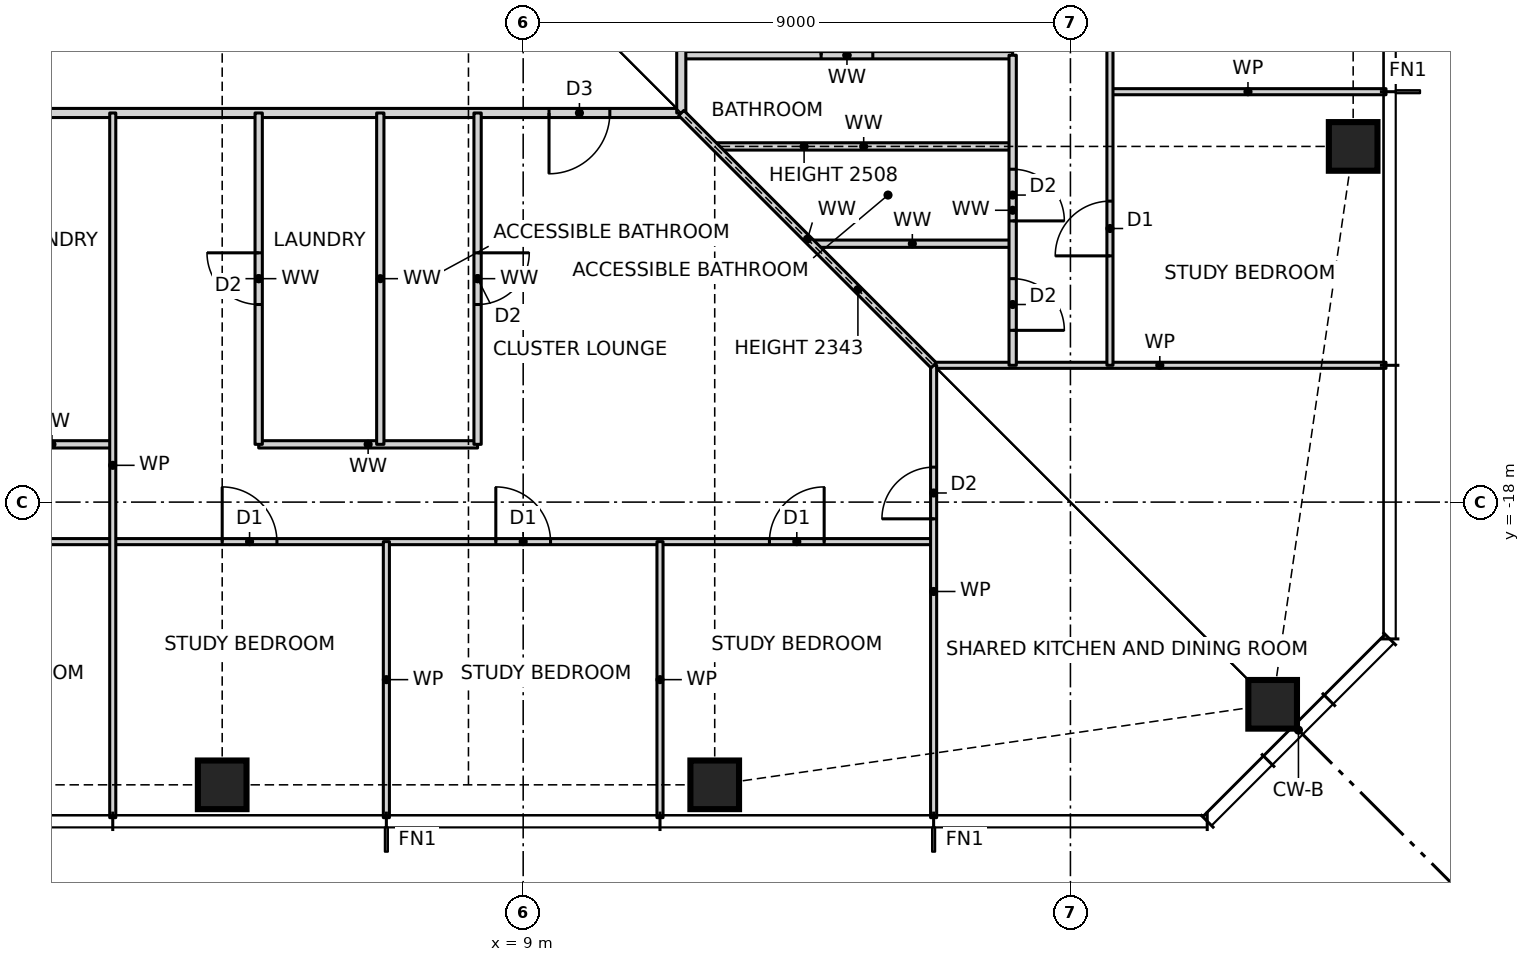
"""IFC4 building model, lengths in metres.
Left out: names, types, materials, properties, quantities, classifications, styles, units other than length and angle.
Written with IfcOpenShell. Run it as: python <this file> out.ifc"""

import sys

from ifc_helpers import new_model, si_unit, direction, frame, frame_2d, origin, origin_2d, place, context, subcontext, project, spatial, rectangle, hollow_rectangle, extrude, element, fill, save


model = new_model("IFC4")
c1 = context("Model", 3, precision=1e-05, world=origin(), true_north=direction((0.0, 1.0)))
c2 = subcontext(c1, "Body", "Model", "MODEL_VIEW")
j1 = project(units=[si_unit("LENGTHUNIT", "METRE"), si_unit("PLANEANGLEUNIT", "RADIAN")], contexts=[c1])
p1 = place(None, origin())
s1 = spatial("IfcSite", under=j1, at=p1, CompositionType="ELEMENT")
p2 = place(p1, origin())
s2 = spatial("IfcBuilding", under=s1, at=p2, CompositionType="ELEMENT")
p3 = place(p2, frame((0.0, 0.0, 50.0)))
s3 = spatial("IfcBuildingStorey", under=s2, at=p3, CompositionType="ELEMENT", Elevation=50.0)
for number, where, z_axis, x_axis in (
    (1, (4.05, -22.65, 0.0), (0.0, 0.0, 1.0), (1.0, 0.0, 0.0)),
    (2, (12.15, -22.65, 0.0), (0.0, 0.0, 1.0), (1.0, 0.0, 0.0)),
    (3, (21.326, -21.326, 0.0), (0.0, 0.0, 1.0), (1.0, 0.0, 0.0)),
    (4, (22.65, -12.15, 0.0), (0.0, 0.0, 1.0), (1.0, 0.0, 0.0)),
):
    element("IfcColumn", number, at=place(p3, frame(where, z_axis=z_axis, x_axis=x_axis)), inside=s3, PredefinedType="COLUMN", context=c2, shape_type="SweptSolid", body=[
        extrude(hollow_rectangle(XDim=0.8, YDim=0.8, WallThickness=0.09, at=origin_2d()), origin(), (0.0, 0.0, 1.0), 3.5),
    ])
p4 = place(p3, frame((-15.75, -18.65, 0.0), z_axis=(0.0, 0.0, 1.0), x_axis=(1.0, 0.0, 0.0)))
e5 = element("IfcWall", 5, at=p4, inside=s3, PredefinedType="PARTITIONING", context=c2, shape_type="SweptSolid", body=[
    extrude(rectangle(XDim=31.5, YDim=0.1, at=frame_2d((15.75, 0.0))), origin(), (0.0, 0.0, 1.0), 3.27),
])
p5 = place(p4, frame((1.8, 0.0, 0.0)))
e6 = element("IfcOpeningElement", 6, at=p5, cuts=e5, PredefinedType="OPENING", context=c2, shape_type="SweptSolid", body=[
    extrude(rectangle(XDim=0.9, YDim=2.1, at=frame_2d((0.45, 1.05))), frame((0.0, 0.06, 0.0), z_axis=(0.0, -1.0, 0.0), x_axis=(1.0, 0.0, 0.0)), (0.0, 0.0, 1.0), 0.12),
])
p6 = place(p4, frame((6.3, 0.0, 0.0)))
e7 = element("IfcOpeningElement", 7, at=p6, cuts=e5, PredefinedType="OPENING", context=c2, shape_type="SweptSolid", body=[
    extrude(rectangle(XDim=0.9, YDim=2.1, at=frame_2d((0.45, 1.05))), frame((0.0, 0.06, 0.0), z_axis=(0.0, -1.0, 0.0), x_axis=(1.0, 0.0, 0.0)), (0.0, 0.0, 1.0), 0.12),
])
p7 = place(p4, frame((10.8, 0.0, 0.0)))
e8 = element("IfcOpeningElement", 8, at=p7, cuts=e5, PredefinedType="OPENING", context=c2, shape_type="SweptSolid", body=[
    extrude(rectangle(XDim=0.9, YDim=2.1, at=frame_2d((0.45, 1.05))), frame((0.0, 0.06, 0.0), z_axis=(0.0, -1.0, 0.0), x_axis=(1.0, 0.0, 0.0)), (0.0, 0.0, 1.0), 0.12),
])
p8 = place(p4, frame((15.3, 0.0, 0.0)))
e9 = element("IfcOpeningElement", 9, at=p8, cuts=e5, PredefinedType="OPENING", context=c2, shape_type="SweptSolid", body=[
    extrude(rectangle(XDim=0.9, YDim=2.1, at=frame_2d((0.45, 1.05))), frame((0.0, 0.06, 0.0), z_axis=(0.0, -1.0, 0.0), x_axis=(1.0, 0.0, 0.0)), (0.0, 0.0, 1.0), 0.12),
])
p9 = place(p4, frame((19.8, 0.0, 0.0)))
e10 = element("IfcOpeningElement", 10, at=p9, cuts=e5, PredefinedType="OPENING", context=c2, shape_type="SweptSolid", body=[
    extrude(rectangle(XDim=0.9, YDim=2.1, at=frame_2d((0.45, 1.05))), frame((0.0, 0.06, 0.0), z_axis=(0.0, -1.0, 0.0), x_axis=(1.0, 0.0, 0.0)), (0.0, 0.0, 1.0), 0.12),
])
p10 = place(p4, frame((24.3, 0.0, 0.0)))
e11 = element("IfcOpeningElement", 11, at=p10, cuts=e5, PredefinedType="OPENING", context=c2, shape_type="SweptSolid", body=[
    extrude(rectangle(XDim=0.9, YDim=2.1, at=frame_2d((0.45, 1.05))), frame((0.0, 0.06, 0.0), z_axis=(0.0, -1.0, 0.0), x_axis=(1.0, 0.0, 0.0)), (0.0, 0.0, 1.0), 0.12),
])
p11 = place(p4, frame((28.8, 0.0, 0.0)))
e12 = element("IfcOpeningElement", 12, at=p11, cuts=e5, PredefinedType="OPENING", context=c2, shape_type="SweptSolid", body=[
    extrude(rectangle(XDim=0.9, YDim=2.1, at=frame_2d((0.45, 1.05))), frame((0.0, 0.06, 0.0), z_axis=(0.0, -1.0, 0.0), x_axis=(1.0, 0.0, 0.0)), (0.0, 0.0, 1.0), 0.12),
])
p12 = place(p3, frame((0.25, -17.05, 0.0), z_axis=(0.0, 0.0, 1.0), x_axis=(1.0, 0.0, 0.0)))
e13 = element("IfcWall", 13, at=p12, inside=s3, PredefinedType="PARTITIONING", context=c2, shape_type="SweptSolid", body=[
    extrude(rectangle(XDim=2.0, YDim=0.12, at=frame_2d((1.0, 0.0))), origin(), (0.0, 0.0, 1.0), 3.27),
])
p13 = place(p3, frame((4.65, -17.05, 0.0), z_axis=(0.0, 0.0, 1.0), x_axis=(1.0, 0.0, 0.0)))
e14 = element("IfcWall", 14, at=p13, inside=s3, PredefinedType="PARTITIONING", context=c2, shape_type="SweptSolid", body=[
    extrude(rectangle(XDim=3.6, YDim=0.12, at=frame_2d((1.8, 0.0))), origin(), (0.0, 0.0, 1.0), 3.27),
])
p14 = place(p3, frame((15.75, -15.75, 0.0), z_axis=(0.0, 0.0, 1.0), x_axis=(1.0, 0.0, 0.0)))
e15 = element("IfcWall", 15, at=p14, inside=s3, PredefinedType="PARTITIONING", context=c2, shape_type="SweptSolid", body=[
    extrude(rectangle(XDim=7.44, YDim=0.1, at=frame_2d((3.72, 0.0))), origin(), (0.0, 0.0, 1.0), 3.27),
])
p15 = place(p3, frame((13.75, -13.75, 0.0), z_axis=(0.0, 0.0, 1.0), x_axis=(1.0, 0.0, 0.0)))
e16 = element("IfcWall", 16, at=p15, inside=s3, PredefinedType="PARTITIONING", context=c2, shape_type="SweptSolid", body=[
    extrude(rectangle(XDim=3.3, YDim=0.12, at=frame_2d((1.65, 0.0))), origin(), (0.0, 0.0, 1.0), 3.27),
])
p16 = place(p3, frame((12.15, -12.15, 0.0), z_axis=(0.0, 0.0, 1.0), x_axis=(1.0, 0.0, 0.0)))
e17 = element("IfcWall", 17, at=p16, inside=s3, PredefinedType="PARTITIONING", context=c2, shape_type="SweptSolid", body=[
    extrude(rectangle(XDim=4.9, YDim=0.12, at=frame_2d((2.45, 0.0))), origin(), (0.0, 0.0, 1.0), 2.508),
])
p17 = place(p3, frame((-12.6, -11.6, 0.0), z_axis=(0.0, 0.0, 1.0), x_axis=(1.0, 0.0, 0.0)))
e18 = element("IfcWall", 18, at=p17, inside=s3, PredefinedType="PARTITIONING", context=c2, shape_type="SweptSolid", body=[
    extrude(rectangle(XDim=24.2, YDim=0.15, at=frame_2d((12.1, 0.0))), origin(), (0.0, 0.0, 1.0), 3.27),
])
p18 = place(p17, frame((1.74, 0.0, 0.0)))
e19 = element("IfcOpeningElement", 19, at=p18, cuts=e18, PredefinedType="OPENING", context=c2, shape_type="SweptSolid", body=[
    extrude(rectangle(XDim=1.0, YDim=2.1, at=frame_2d((0.5, 1.05))), frame((0.0, 0.085, 0.0), z_axis=(0.0, -1.0, 0.0), x_axis=(1.0, 0.0, 0.0)), (0.0, 0.0, 1.0), 0.17),
])
p19 = place(p17, frame((22.025, 0.0, 0.0)))
e20 = element("IfcOpeningElement", 20, at=p19, cuts=e18, PredefinedType="OPENING", context=c2, shape_type="SweptSolid", body=[
    extrude(rectangle(XDim=1.0, YDim=2.1, at=frame_2d((0.5, 1.05))), frame((0.0, 0.085, 0.0), z_axis=(0.0, -1.0, 0.0), x_axis=(1.0, 0.0, 0.0)), (0.0, 0.0, 1.0), 0.17),
])
p20 = place(p3, frame((18.65, -11.25, 0.0), z_axis=(0.0, 0.0, 1.0), x_axis=(1.0, 0.0, 0.0)))
e21 = element("IfcWall", 21, at=p20, inside=s3, PredefinedType="PARTITIONING", context=c2, shape_type="SweptSolid", body=[
    extrude(rectangle(XDim=4.54, YDim=0.1, at=frame_2d((2.27, 0.0))), origin(), (0.0, 0.0, 1.0), 3.27),
])
p21 = place(p3, frame((11.6, -10.65, 0.0), z_axis=(0.0, 0.0, 1.0), x_axis=(1.0, 0.0, 0.0)))
e22 = element("IfcWall", 22, at=p21, inside=s3, PredefinedType="PARTITIONING", context=c2, shape_type="SweptSolid", body=[
    extrude(rectangle(XDim=5.45, YDim=0.12, at=frame_2d((2.725, 0.0))), origin(), (0.0, 0.0, 1.0), 3.27),
])
p22 = place(p21, frame((2.3, 0.0, 0.0)))
e23 = element("IfcOpeningElement", 23, at=p22, cuts=e22, PredefinedType="OPENING", context=c2, shape_type="SweptSolid", body=[
    extrude(rectangle(XDim=0.85, YDim=2.1, at=frame_2d((0.425, 1.05))), frame((0.0, 0.07, 0.0), z_axis=(0.0, -1.0, 0.0), x_axis=(1.0, 0.0, 0.0)), (0.0, 0.0, 1.0), 0.14),
])
p23 = place(p3, frame((18.65, -15.75, 0.0), z_axis=(0.0, 0.0, 1.0), x_axis=(0.0, 1.0, 0.0)))
e24 = element("IfcWall", 24, at=p23, inside=s3, PredefinedType="PARTITIONING", context=c2, shape_type="SweptSolid", body=[
    extrude(rectangle(XDim=31.5, YDim=0.1, at=frame_2d((15.75, 0.0))), origin(), (0.0, 0.0, 1.0), 3.27),
])
p24 = place(p23, frame((1.8, 0.0, 0.0)))
e25 = element("IfcOpeningElement", 25, at=p24, cuts=e24, PredefinedType="OPENING", context=c2, shape_type="SweptSolid", body=[
    extrude(rectangle(XDim=0.9, YDim=2.1, at=frame_2d((0.45, 1.05))), frame((0.0, 0.06, 0.0), z_axis=(0.0, -1.0, 0.0), x_axis=(1.0, 0.0, 0.0)), (0.0, 0.0, 1.0), 0.12),
])
p25 = place(p23, frame((6.3, 0.0, 0.0)))
e26 = element("IfcOpeningElement", 26, at=p25, cuts=e24, PredefinedType="OPENING", context=c2, shape_type="SweptSolid", body=[
    extrude(rectangle(XDim=0.9, YDim=2.1, at=frame_2d((0.45, 1.05))), frame((0.0, 0.06, 0.0), z_axis=(0.0, -1.0, 0.0), x_axis=(1.0, 0.0, 0.0)), (0.0, 0.0, 1.0), 0.12),
])
p26 = place(p23, frame((10.8, 0.0, 0.0)))
e27 = element("IfcOpeningElement", 27, at=p26, cuts=e24, PredefinedType="OPENING", context=c2, shape_type="SweptSolid", body=[
    extrude(rectangle(XDim=0.9, YDim=2.1, at=frame_2d((0.45, 1.05))), frame((0.0, 0.06, 0.0), z_axis=(0.0, -1.0, 0.0), x_axis=(1.0, 0.0, 0.0)), (0.0, 0.0, 1.0), 0.12),
])
p27 = place(p23, frame((15.3, 0.0, 0.0)))
e28 = element("IfcOpeningElement", 28, at=p27, cuts=e24, PredefinedType="OPENING", context=c2, shape_type="SweptSolid", body=[
    extrude(rectangle(XDim=0.9, YDim=2.1, at=frame_2d((0.45, 1.05))), frame((0.0, 0.06, 0.0), z_axis=(0.0, -1.0, 0.0), x_axis=(1.0, 0.0, 0.0)), (0.0, 0.0, 1.0), 0.12),
])
p28 = place(p23, frame((19.8, 0.0, 0.0)))
e29 = element("IfcOpeningElement", 29, at=p28, cuts=e24, PredefinedType="OPENING", context=c2, shape_type="SweptSolid", body=[
    extrude(rectangle(XDim=0.9, YDim=2.1, at=frame_2d((0.45, 1.05))), frame((0.0, 0.06, 0.0), z_axis=(0.0, -1.0, 0.0), x_axis=(1.0, 0.0, 0.0)), (0.0, 0.0, 1.0), 0.12),
])
p29 = place(p23, frame((24.3, 0.0, 0.0)))
e30 = element("IfcOpeningElement", 30, at=p29, cuts=e24, PredefinedType="OPENING", context=c2, shape_type="SweptSolid", body=[
    extrude(rectangle(XDim=0.9, YDim=2.1, at=frame_2d((0.45, 1.05))), frame((0.0, 0.06, 0.0), z_axis=(0.0, -1.0, 0.0), x_axis=(1.0, 0.0, 0.0)), (0.0, 0.0, 1.0), 0.12),
])
p30 = place(p23, frame((28.8, 0.0, 0.0)))
e31 = element("IfcOpeningElement", 31, at=p30, cuts=e24, PredefinedType="OPENING", context=c2, shape_type="SweptSolid", body=[
    extrude(rectangle(XDim=0.9, YDim=2.1, at=frame_2d((0.45, 1.05))), frame((0.0, 0.06, 0.0), z_axis=(0.0, -1.0, 0.0), x_axis=(1.0, 0.0, 0.0)), (0.0, 0.0, 1.0), 0.12),
])
p31 = place(p3, frame((17.05, -15.75, 0.0), z_axis=(0.0, 0.0, 1.0), x_axis=(0.0, 1.0, 0.0)))
e32 = element("IfcWall", 32, at=p31, inside=s3, PredefinedType="PARTITIONING", context=c2, shape_type="SweptSolid", body=[
    extrude(rectangle(XDim=5.1, YDim=0.12, at=frame_2d((2.55, 0.0))), origin(), (0.0, 0.0, 1.0), 3.27),
])
p32 = place(p31, frame((0.575, 0.0, 0.0)))
e33 = element("IfcOpeningElement", 33, at=p32, cuts=e32, PredefinedType="OPENING", context=c2, shape_type="SweptSolid", body=[
    extrude(rectangle(XDim=0.85, YDim=2.1, at=frame_2d((0.425, 1.05))), frame((0.0, 0.07, 0.0), z_axis=(0.0, -1.0, 0.0), x_axis=(1.0, 0.0, 0.0)), (0.0, 0.0, 1.0), 0.14),
])
p33 = place(p31, frame((2.375, 0.0, 0.0)))
e34 = element("IfcOpeningElement", 34, at=p33, cuts=e32, PredefinedType="OPENING", context=c2, shape_type="SweptSolid", body=[
    extrude(rectangle(XDim=0.85, YDim=2.1, at=frame_2d((0.425, 1.05))), frame((0.0, 0.07, 0.0), z_axis=(0.0, -1.0, 0.0), x_axis=(1.0, 0.0, 0.0)), (0.0, 0.0, 1.0), 0.14),
])
p34 = place(p3, frame((15.75, -23.19, 0.0), z_axis=(0.0, 0.0, 1.0), x_axis=(0.0, 1.0, 0.0)))
e35 = element("IfcWall", 35, at=p34, inside=s3, PredefinedType="PARTITIONING", context=c2, shape_type="SweptSolid", body=[
    extrude(rectangle(XDim=7.44, YDim=0.1, at=frame_2d((3.72, 0.0))), origin(), (0.0, 0.0, 1.0), 3.27),
])
p35 = place(p34, frame((4.915, 0.0, 0.0)))
e36 = element("IfcOpeningElement", 36, at=p35, cuts=e35, PredefinedType="OPENING", context=c2, shape_type="SweptSolid", body=[
    extrude(rectangle(XDim=0.85, YDim=2.1, at=frame_2d((0.425, 1.05))), frame((0.0, 0.06, 0.0), z_axis=(0.0, -1.0, 0.0), x_axis=(1.0, 0.0, 0.0)), (0.0, 0.0, 1.0), 0.12),
])
p36 = place(p3, frame((11.6, -11.6, 0.0), z_axis=(0.0, 0.0, 1.0), x_axis=(0.0, 1.0, 0.0)))
e37 = element("IfcWall", 37, at=p36, inside=s3, PredefinedType="PARTITIONING", context=c2, shape_type="SweptSolid", body=[
    extrude(rectangle(XDim=23.2, YDim=0.15, at=frame_2d((11.6, 0.0))), origin(), (0.0, 0.0, 1.0), 3.27),
])
p37 = place(p36, frame((1.65, 0.0, 0.0)))
e38 = element("IfcOpeningElement", 38, at=p37, cuts=e37, PredefinedType="OPENING", context=c2, shape_type="SweptSolid", body=[
    extrude(rectangle(XDim=1.0, YDim=2.1, at=frame_2d((0.5, 1.05))), frame((0.0, 0.085, 0.0), z_axis=(0.0, -1.0, 0.0), x_axis=(1.0, 0.0, 0.0)), (0.0, 0.0, 1.0), 0.17),
])
p38 = place(p36, frame((3.8, 0.0, 0.0)))
e39 = element("IfcOpeningElement", 39, at=p38, cuts=e37, PredefinedType="OPENING", context=c2, shape_type="SweptSolid", body=[
    extrude(rectangle(XDim=0.9, YDim=2.1, at=frame_2d((0.45, 1.05))), frame((0.0, 0.085, 0.0), z_axis=(0.0, -1.0, 0.0), x_axis=(1.0, 0.0, 0.0)), (0.0, 0.0, 1.0), 0.17),
])
p39 = place(p3, frame((11.25, -23.19, 0.0), z_axis=(0.0, 0.0, 1.0), x_axis=(0.0, 1.0, 0.0)))
e40 = element("IfcWall", 40, at=p39, inside=s3, PredefinedType="PARTITIONING", context=c2, shape_type="SweptSolid", body=[
    extrude(rectangle(XDim=4.54, YDim=0.1, at=frame_2d((2.27, 0.0))), origin(), (0.0, 0.0, 1.0), 3.27),
])
p40 = place(p3, frame((8.25, -17.05, 0.0), z_axis=(0.0, 0.0, 1.0), x_axis=(0.0, 1.0, 0.0)))
e41 = element("IfcWall", 41, at=p40, inside=s3, PredefinedType="PARTITIONING", context=c2, shape_type="SweptSolid", body=[
    extrude(rectangle(XDim=5.45, YDim=0.12, at=frame_2d((2.725, 0.0))), origin(), (0.0, 0.0, 1.0), 3.27),
])
p41 = place(p40, frame((2.3, 0.0, 0.0)))
e42 = element("IfcOpeningElement", 42, at=p41, cuts=e41, PredefinedType="OPENING", context=c2, shape_type="SweptSolid", body=[
    extrude(rectangle(XDim=0.85, YDim=2.1, at=frame_2d((0.425, 1.05))), frame((0.0, 0.07, 0.0), z_axis=(0.0, -1.0, 0.0), x_axis=(1.0, 0.0, 0.0)), (0.0, 0.0, 1.0), 0.14),
])
p42 = place(p3, frame((6.75, -23.19, 0.0), z_axis=(0.0, 0.0, 1.0), x_axis=(0.0, 1.0, 0.0)))
e43 = element("IfcWall", 43, at=p42, inside=s3, PredefinedType="PARTITIONING", context=c2, shape_type="SweptSolid", body=[
    extrude(rectangle(XDim=4.54, YDim=0.1, at=frame_2d((2.27, 0.0))), origin(), (0.0, 0.0, 1.0), 3.27),
])
p43 = place(p3, frame((6.65, -17.05, 0.0), z_axis=(0.0, 0.0, 1.0), x_axis=(0.0, 1.0, 0.0)))
e44 = element("IfcWall", 44, at=p43, inside=s3, PredefinedType="PARTITIONING", context=c2, shape_type="SweptSolid", body=[
    extrude(rectangle(XDim=5.45, YDim=0.12, at=frame_2d((2.725, 0.0))), origin(), (0.0, 0.0, 1.0), 3.27),
])
p44 = place(p3, frame((4.65, -17.05, 0.0), z_axis=(0.0, 0.0, 1.0), x_axis=(0.0, 1.0, 0.0)))
e45 = element("IfcWall", 45, at=p44, inside=s3, PredefinedType="PARTITIONING", context=c2, shape_type="SweptSolid", body=[
    extrude(rectangle(XDim=5.45, YDim=0.12, at=frame_2d((2.725, 0.0))), origin(), (0.0, 0.0, 1.0), 3.27),
])
p45 = place(p44, frame((2.3, 0.0, 0.0)))
e46 = element("IfcOpeningElement", 46, at=p45, cuts=e45, PredefinedType="OPENING", context=c2, shape_type="SweptSolid", body=[
    extrude(rectangle(XDim=0.85, YDim=2.1, at=frame_2d((0.425, 1.05))), frame((0.0, 0.07, 0.0), z_axis=(0.0, -1.0, 0.0), x_axis=(1.0, 0.0, 0.0)), (0.0, 0.0, 1.0), 0.14),
])
p46 = place(p3, frame((2.25, -23.19, 0.0), z_axis=(0.0, 0.0, 1.0), x_axis=(0.0, 1.0, 0.0)))
e47 = element("IfcWall", 47, at=p46, inside=s3, PredefinedType="PARTITIONING", context=c2, shape_type="SweptSolid", body=[
    extrude(rectangle(XDim=11.59, YDim=0.1, at=frame_2d((5.795, 0.0))), origin(), (0.0, 0.0, 1.0), 3.27),
])
p47 = place(p3, frame((15.75, -15.75, 0.0), z_axis=(0.0, 0.0, 1.0), x_axis=(-0.707106781187, 0.707106781187, 0.0)))
e48 = element("IfcWall", 48, at=p47, inside=s3, PredefinedType="PARTITIONING", context=c2, shape_type="SweptSolid", body=[
    extrude(rectangle(XDim=5.869, YDim=0.12, at=frame_2d((2.935, 0.0))), origin(), (0.0, 0.0, 1.0), 2.343),
])
p48 = place(p9, origin())
e49 = element("IfcDoor", 49, at=p48, inside=s3, OperationType="SINGLE_SWING_LEFT", PredefinedType="DOOR", context=c2, shape_type="SweptSolid", body=[
    extrude(rectangle(XDim=0.9, YDim=2.1, at=frame_2d((0.45, 1.05))), frame((0.0, 0.025, 0.0), z_axis=(0.0, -1.0, 0.0), x_axis=(1.0, 0.0, 0.0)), (0.0, 0.0, 1.0), 0.05),
])
fill(e10, e49)
p49 = place(p10, origin())
e50 = element("IfcDoor", 50, at=p49, inside=s3, OperationType="SINGLE_SWING_LEFT", PredefinedType="DOOR", context=c2, shape_type="SweptSolid", body=[
    extrude(rectangle(XDim=0.9, YDim=2.1, at=frame_2d((0.45, 1.05))), frame((0.0, 0.025, 0.0), z_axis=(0.0, -1.0, 0.0), x_axis=(1.0, 0.0, 0.0)), (0.0, 0.0, 1.0), 0.05),
])
fill(e11, e50)
p50 = place(p11, origin())
e51 = element("IfcDoor", 51, at=p50, inside=s3, OperationType="SINGLE_SWING_RIGHT", PredefinedType="DOOR", context=c2, shape_type="SweptSolid", body=[
    extrude(rectangle(XDim=0.9, YDim=2.1, at=frame_2d((0.45, 1.05))), frame((0.0, 0.025, 0.0), z_axis=(0.0, -1.0, 0.0), x_axis=(1.0, 0.0, 0.0)), (0.0, 0.0, 1.0), 0.05),
])
fill(e12, e51)
p51 = place(p19, frame((1.0, 0.0, 0.0), z_axis=(0.0, 0.0, 1.0), x_axis=(-1.0, 0.0, 0.0)))
e52 = element("IfcDoor", 52, at=p51, inside=s3, OperationType="SINGLE_SWING_RIGHT", PredefinedType="DOOR", context=c2, shape_type="SweptSolid", body=[
    extrude(rectangle(XDim=1.0, YDim=2.1, at=frame_2d((0.5, 1.05))), frame((0.0, 0.025, 0.0), z_axis=(0.0, -1.0, 0.0), x_axis=(1.0, 0.0, 0.0)), (0.0, 0.0, 1.0), 0.05),
])
fill(e20, e52)
p52 = place(p45, origin())
e53 = element("IfcDoor", 53, at=p52, inside=s3, OperationType="SINGLE_SWING_RIGHT", PredefinedType="DOOR", context=c2, shape_type="SweptSolid", body=[
    extrude(rectangle(XDim=0.85, YDim=2.1, at=frame_2d((0.425, 1.05))), frame((0.0, 0.025, 0.0), z_axis=(0.0, -1.0, 0.0), x_axis=(1.0, 0.0, 0.0)), (0.0, 0.0, 1.0), 0.05),
])
fill(e46, e53)
p53 = place(p41, frame((0.85, 0.0, 0.0), z_axis=(0.0, 0.0, 1.0), x_axis=(-1.0, 0.0, 0.0)))
e54 = element("IfcDoor", 54, at=p53, inside=s3, OperationType="SINGLE_SWING_LEFT", PredefinedType="DOOR", context=c2, shape_type="SweptSolid", body=[
    extrude(rectangle(XDim=0.85, YDim=2.1, at=frame_2d((0.425, 1.05))), frame((0.0, 0.025, 0.0), z_axis=(0.0, -1.0, 0.0), x_axis=(1.0, 0.0, 0.0)), (0.0, 0.0, 1.0), 0.05),
])
fill(e42, e54)
p54 = place(p24, origin())
e55 = element("IfcDoor", 55, at=p54, inside=s3, OperationType="SINGLE_SWING_LEFT", PredefinedType="DOOR", context=c2, shape_type="SweptSolid", body=[
    extrude(rectangle(XDim=0.9, YDim=2.1, at=frame_2d((0.45, 1.05))), frame((0.0, 0.025, 0.0), z_axis=(0.0, -1.0, 0.0), x_axis=(1.0, 0.0, 0.0)), (0.0, 0.0, 1.0), 0.05),
])
fill(e25, e55)
p55 = place(p32, frame((0.85, 0.0, 0.0), z_axis=(0.0, 0.0, 1.0), x_axis=(-1.0, 0.0, 0.0)))
e56 = element("IfcDoor", 56, at=p55, inside=s3, OperationType="SINGLE_SWING_RIGHT", PredefinedType="DOOR", context=c2, shape_type="SweptSolid", body=[
    extrude(rectangle(XDim=0.85, YDim=2.1, at=frame_2d((0.425, 1.05))), frame((0.0, 0.025, 0.0), z_axis=(0.0, -1.0, 0.0), x_axis=(1.0, 0.0, 0.0)), (0.0, 0.0, 1.0), 0.05),
])
fill(e33, e56)
p56 = place(p33, frame((0.85, 0.0, 0.0), z_axis=(0.0, 0.0, 1.0), x_axis=(-1.0, 0.0, 0.0)))
e57 = element("IfcDoor", 57, at=p56, inside=s3, OperationType="SINGLE_SWING_RIGHT", PredefinedType="DOOR", context=c2, shape_type="SweptSolid", body=[
    extrude(rectangle(XDim=0.85, YDim=2.1, at=frame_2d((0.425, 1.05))), frame((0.0, 0.025, 0.0), z_axis=(0.0, -1.0, 0.0), x_axis=(1.0, 0.0, 0.0)), (0.0, 0.0, 1.0), 0.05),
])
fill(e34, e57)
p57 = place(p22, origin())
e58 = element("IfcDoor", 58, at=p57, inside=s3, OperationType="SINGLE_SWING_LEFT", PredefinedType="DOOR", context=c2, shape_type="SweptSolid", body=[
    extrude(rectangle(XDim=0.85, YDim=2.1, at=frame_2d((0.425, 1.05))), frame((0.0, 0.025, 0.0), z_axis=(0.0, -1.0, 0.0), x_axis=(1.0, 0.0, 0.0)), (0.0, 0.0, 1.0), 0.05),
])
fill(e23, e58)
p58 = place(p35, origin())
e59 = element("IfcDoor", 59, at=p58, inside=s3, OperationType="SINGLE_SWING_LEFT", PredefinedType="DOOR", context=c2, shape_type="SweptSolid", body=[
    extrude(rectangle(XDim=0.85, YDim=2.1, at=frame_2d((0.425, 1.05))), frame((0.0, 0.025, 0.0), z_axis=(0.0, -1.0, 0.0), x_axis=(1.0, 0.0, 0.0)), (0.0, 0.0, 1.0), 0.05),
])
fill(e36, e59)
save(model, sys.argv[1])
